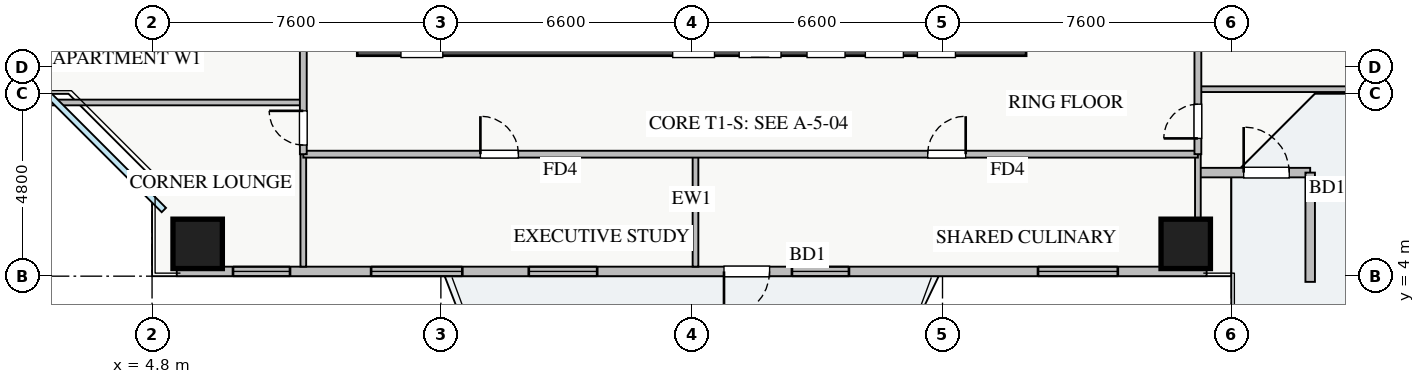
"""IFC4 building model, lengths in metres.
Left out: names, types, materials, properties, quantities, classifications, styles, units other than length and angle.
Written with IfcOpenShell. Run it as: python <this file> out.ifc"""

import sys

from ifc_helpers import new_model, si_unit, direction, frame, frame_2d, origin, origin_2d, place, context, subcontext, project, spatial, rectangle, extrude, source, transform, mapped, element, fill, save


model = new_model("IFC4")
c1 = context("Model", 3, precision=1e-05, world=origin(), true_north=direction((0.0, 1.0)))
c2 = subcontext(c1, "Body", "Model", "MODEL_VIEW")
j1 = project(units=[si_unit("LENGTHUNIT", "METRE"), si_unit("PLANEANGLEUNIT", "RADIAN")], contexts=[c1])
p1 = place(None, origin())
s1 = spatial("IfcSite", under=j1, at=p1, CompositionType="ELEMENT")
p2 = place(p1, origin())
s2 = spatial("IfcBuilding", under=s1, at=p2, CompositionType="ELEMENT")
p3 = place(p2, frame((0.0, 0.0, 73.0)))
s3 = spatial("IfcBuildingStorey", under=s2, at=p3, CompositionType="ELEMENT", Elevation=73.0)
p4 = place(p3, frame((10.2, 10.2, 0.0), z_axis=(0.0, 0.0, 1.0), x_axis=(1.0, 0.0, 0.0)))
e1 = element("IfcWall", 1, at=p4, inside=s3, PredefinedType="SHEAR", context=c2, shape_type="SweptSolid", body=[
    extrude(rectangle(XDim=17.6, YDim=0.8, at=frame_2d((8.8, 0.0))), origin(), (0.0, 0.0, 1.0), 3.25),
])
p5 = place(p4, frame((1.15, 0.0, 0.0)))
e2 = element("IfcOpeningElement", 2, at=p5, cuts=e1, PredefinedType="OPENING", context=c2, shape_type="SweptSolid", body=[
    extrude(rectangle(XDim=1.1, YDim=2.05, at=frame_2d((0.55, 1.025))), frame((0.0, 0.41, 0.0), z_axis=(0.0, -1.0, 0.0), x_axis=(1.0, 0.0, 0.0)), (0.0, 0.0, 1.0), 0.82),
])
p6 = place(p4, frame((8.3, 0.0, 0.0)))
e3 = element("IfcOpeningElement", 3, at=p6, cuts=e1, PredefinedType="OPENING", context=c2, shape_type="SweptSolid", body=[
    extrude(rectangle(XDim=1.1, YDim=2.05, at=frame_2d((0.55, 1.025))), frame((0.0, 0.41, 0.0), z_axis=(0.0, -1.0, 0.0), x_axis=(1.0, 0.0, 0.0)), (0.0, 0.0, 1.0), 0.82),
])
p7 = place(p4, frame((10.05, 0.0, 0.0)))
e4 = element("IfcOpeningElement", 4, at=p7, cuts=e1, PredefinedType="OPENING", context=c2, shape_type="SweptSolid", body=[
    extrude(rectangle(XDim=1.1, YDim=2.05, at=frame_2d((0.55, 1.025))), frame((0.0, 0.41, 0.0), z_axis=(0.0, -1.0, 0.0), x_axis=(1.0, 0.0, 0.0)), (0.0, 0.0, 1.0), 0.82),
])
p8 = place(p4, frame((14.74, 0.0, 0.0)))
e5 = element("IfcOpeningElement", 5, at=p8, cuts=e1, PredefinedType="OPENING", context=c2, shape_type="SweptSolid", body=[
    extrude(rectangle(XDim=1.0, YDim=2.05, at=frame_2d((0.5, 1.025))), frame((0.0, 0.41, 0.0), z_axis=(0.0, -1.0, 0.0), x_axis=(1.0, 0.0, 0.0)), (0.0, 0.0, 1.0), 0.82),
])
p9 = place(p4, frame((11.835, 0.0, 0.0)))
e6 = element("IfcOpeningElement", 6, at=p9, cuts=e1, PredefinedType="OPENING", context=c2, shape_type="SweptSolid", body=[
    extrude(rectangle(XDim=1.0, YDim=2.05, at=frame_2d((0.5, 1.025))), frame((0.0, 0.41, 0.0), z_axis=(0.0, -1.0, 0.0), x_axis=(1.0, 0.0, 0.0)), (0.0, 0.0, 1.0), 0.82),
])
p10 = place(p4, frame((13.37, 0.0, 0.0)))
e7 = element("IfcOpeningElement", 7, at=p10, cuts=e1, PredefinedType="OPENING", context=c2, shape_type="SweptSolid", body=[
    extrude(rectangle(XDim=1.0, YDim=2.05, at=frame_2d((0.5, 1.025))), frame((0.0, 0.41, 0.0), z_axis=(0.0, -1.0, 0.0), x_axis=(1.0, 0.0, 0.0)), (0.0, 0.0, 1.0), 0.82),
])
m1 = source(origin(), c2, "Body", "SweptSolid", [
    extrude(rectangle(XDim=1.3, YDim=1.3, at=origin_2d()), origin(), (0.0, 0.0, 1.0), 3.25),
])
for number, where, z_axis, x_axis in (
    (8, (6.0, 4.85, 0.0), (0.0, 0.0, 1.0), (1.0, 0.0, 0.0)),
    (9, (32.0, 4.85, 0.0), (0.0, 0.0, 1.0), (1.0, 0.0, 0.0)),
):
    element("IfcColumn", number, at=place(p3, frame(where, z_axis=z_axis, x_axis=x_axis)), inside=s3, PredefinedType="COLUMN", context=c2, shape_type="MappedRepresentation", body=[
        mapped(m1, transform((0.0, 0.0, 0.0), x_axis=(1.0, 0.0, 0.0), y_axis=(0.0, 1.0, 0.0), z_axis=(0.0, 0.0, 1.0), scale=1.0)),
    ])
p11 = place(p3, frame((5.45, 4.125, 0.0), z_axis=(0.0, 0.0, 1.0), x_axis=(1.0, 0.0, 0.0)))
e10 = element("IfcWall", 10, at=p11, inside=s3, PredefinedType="STANDARD", context=c2, shape_type="SweptSolid", body=[
    extrude(rectangle(XDim=27.1, YDim=0.25, at=frame_2d((13.55, 0.0))), origin(), (0.0, 0.0, 1.0), 2.61),
])
p12 = place(p11, frame((14.4, 0.0, 0.0)))
e11 = element("IfcOpeningElement", 11, at=p12, cuts=e10, PredefinedType="OPENING", context=c2, shape_type="SweptSolid", body=[
    extrude(rectangle(XDim=1.2, YDim=2.1, at=frame_2d((0.6, 1.05))), frame((0.0, 0.135, 0.0), z_axis=(0.0, -1.0, 0.0), x_axis=(1.0, 0.0, 0.0)), (0.0, 0.0, 1.0), 0.27),
])
p13 = place(p11, frame((1.48, 0.0, 0.9)))
e12 = element("IfcOpeningElement", 12, at=p13, cuts=e10, PredefinedType="OPENING", context=c2, shape_type="SweptSolid", body=[
    extrude(rectangle(XDim=1.5, YDim=1.5, at=frame_2d((0.75, 0.75))), frame((0.0, 0.135, 0.0), z_axis=(0.0, -1.0, 0.0), x_axis=(1.0, 0.0, 0.0)), (0.0, 0.0, 1.0), 0.27),
])
p14 = place(p11, frame((9.263, 0.0, 0.9)))
e13 = element("IfcOpeningElement", 13, at=p14, cuts=e10, PredefinedType="OPENING", context=c2, shape_type="SweptSolid", body=[
    extrude(rectangle(XDim=1.8, YDim=1.45, at=frame_2d((0.9, 0.725))), frame((0.0, 0.135, 0.0), z_axis=(0.0, -1.0, 0.0), x_axis=(1.0, 0.0, 0.0)), (0.0, 0.0, 1.0), 0.27),
])
p15 = place(p11, frame((16.188, 0.0, 0.9)))
e14 = element("IfcOpeningElement", 14, at=p15, cuts=e10, PredefinedType="OPENING", context=c2, shape_type="SweptSolid", body=[
    extrude(rectangle(XDim=1.5, YDim=1.45, at=frame_2d((0.75, 0.725))), frame((0.0, 0.135, 0.0), z_axis=(0.0, -1.0, 0.0), x_axis=(1.0, 0.0, 0.0)), (0.0, 0.0, 1.0), 0.27),
])
p16 = place(p11, frame((22.663, 0.0, 0.9)))
e15 = element("IfcOpeningElement", 15, at=p16, cuts=e10, PredefinedType="OPENING", context=c2, shape_type="SweptSolid", body=[
    extrude(rectangle(XDim=2.1, YDim=1.48, at=frame_2d((1.05, 0.74))), frame((0.0, 0.135, 0.0), z_axis=(0.0, -1.0, 0.0), x_axis=(1.0, 0.0, 0.0)), (0.0, 0.0, 1.0), 0.27),
])
p17 = place(p11, frame((5.114, 0.0, 0.9)))
e16 = element("IfcOpeningElement", 16, at=p17, cuts=e10, PredefinedType="OPENING", context=c2, shape_type="SweptSolid", body=[
    extrude(rectangle(XDim=2.4, YDim=1.5, at=frame_2d((1.2, 0.75))), frame((0.0, 0.135, 0.0), z_axis=(0.0, -1.0, 0.0), x_axis=(1.0, 0.0, 0.0)), (0.0, 0.0, 1.0), 0.27),
])
p18 = place(p3, frame((32.375, 6.725, 0.0), z_axis=(0.0, 0.0, 1.0), x_axis=(1.0, 0.0, 0.0)))
e17 = element("IfcWall", 17, at=p18, inside=s3, PredefinedType="STANDARD", context=c2, shape_type="SweptSolid", body=[
    extrude(rectangle(XDim=2.9, YDim=0.25, at=frame_2d((1.45, 0.0))), origin(), (0.0, 0.0, 1.0), 2.61),
])
p19 = place(p18, frame((1.15, 0.0, 0.0)))
e18 = element("IfcOpeningElement", 18, at=p19, cuts=e17, PredefinedType="OPENING", context=c2, shape_type="SweptSolid", body=[
    extrude(rectangle(XDim=1.2, YDim=2.1, at=frame_2d((0.6, 1.05))), frame((0.0, 0.135, 0.0), z_axis=(0.0, -1.0, 0.0), x_axis=(1.0, 0.0, 0.0)), (0.0, 0.0, 1.0), 0.27),
])
p20 = place(p3, frame((35.275, 3.85, 0.0), z_axis=(0.0, 0.0, 1.0), x_axis=(0.0, 1.0, 0.0)))
e19 = element("IfcWall", 19, at=p20, inside=s3, PredefinedType="STANDARD", context=c2, shape_type="SweptSolid", body=[
    extrude(rectangle(XDim=2.875, YDim=0.25, at=frame_2d((1.438, 0.0))), origin(), (0.0, 0.0, 1.0), 2.61),
])
p21 = place(p3, frame((19.1, 4.25, 0.0), z_axis=(0.0, 0.0, 1.0), x_axis=(0.0, 1.0, 0.0)))
e20 = element("IfcWall", 20, at=p21, inside=s3, PredefinedType="PARTITIONING", context=c2, shape_type="SweptSolid", body=[
    extrude(rectangle(XDim=2.96, YDim=0.15, at=frame_2d((1.48, 0.0))), origin(), (0.0, 0.0, 1.0), 2.771),
])
for number, where, z_axis, x_axis in (
    (21, (8.78, 4.25, 0.0), (0.0, 0.0, 1.0), (0.0, 1.0, 0.0)),
    (22, (32.32, 4.25, 0.0), (0.0, 0.0, 1.0), (0.0, 1.0, 0.0)),
):
    element("IfcWall", number, at=place(p3, frame(where, z_axis=z_axis, x_axis=x_axis)), inside=s3, PredefinedType="PARTITIONING", context=c2, shape_type="SweptSolid", body=[
        extrude(rectangle(XDim=2.96, YDim=0.15, at=frame_2d((1.48, 0.0))), origin(), (0.0, 0.0, 1.0), 3.07),
    ])
p22 = place(p3, frame((8.78, 7.21, 0.0), z_axis=(0.0, 0.0, 1.0), x_axis=(1.0, 0.0, 0.0)))
e23 = element("IfcWall", 23, at=p22, inside=s3, PredefinedType="PARTITIONING", context=c2, shape_type="SweptSolid", body=[
    extrude(rectangle(XDim=23.54, YDim=0.18, at=frame_2d((11.77, 0.0))), origin(), (0.0, 0.0, 1.0), 3.07),
])
p23 = place(p22, frame((4.66, 0.0, 0.0)))
e24 = element("IfcOpeningElement", 24, at=p23, cuts=e23, PredefinedType="OPENING", context=c2, shape_type="SweptSolid", body=[
    extrude(rectangle(XDim=1.0, YDim=2.05, at=frame_2d((0.5, 1.025))), frame((0.0, 0.1, 0.0), z_axis=(0.0, -1.0, 0.0), x_axis=(1.0, 0.0, 0.0)), (0.0, 0.0, 1.0), 0.2),
])
p24 = place(p22, frame((16.43, 0.0, 0.0)))
e25 = element("IfcOpeningElement", 25, at=p24, cuts=e23, PredefinedType="OPENING", context=c2, shape_type="SweptSolid", body=[
    extrude(rectangle(XDim=1.0, YDim=2.05, at=frame_2d((0.5, 1.025))), frame((0.0, 0.1, 0.0), z_axis=(0.0, -1.0, 0.0), x_axis=(1.0, 0.0, 0.0)), (0.0, 0.0, 1.0), 0.2),
])
p25 = place(p3, frame((0.25, 8.57, 0.0), z_axis=(0.0, 0.0, 1.0), x_axis=(1.0, 0.0, 0.0)))
e26 = element("IfcWall", 26, at=p25, inside=s3, PredefinedType="PARTITIONING", context=c2, shape_type="SweptSolid", body=[
    extrude(rectangle(XDim=8.53, YDim=0.15, at=frame_2d((4.265, 0.0))), origin(), (0.0, 0.0, 1.0), 3.07),
])
p26 = place(p3, frame((8.78, 7.21, 0.0), z_axis=(0.0, 0.0, 1.0), x_axis=(0.0, 1.0, 0.0)))
e27 = element("IfcWall", 27, at=p26, inside=s3, PredefinedType="PARTITIONING", context=c2, shape_type="SweptSolid", body=[
    extrude(rectangle(XDim=31.23, YDim=0.18, at=frame_2d((15.615, 0.0))), origin(), (0.0, 0.0, 1.0), 3.07),
])
p27 = place(p26, frame((30.09, 0.0, 0.0)))
e28 = element("IfcOpeningElement", 28, at=p27, cuts=e27, PredefinedType="OPENING", context=c2, shape_type="SweptSolid", body=[
    extrude(rectangle(XDim=0.9, YDim=2.05, at=frame_2d((0.45, 1.025))), frame((0.0, 0.1, 0.0), z_axis=(0.0, -1.0, 0.0), x_axis=(1.0, 0.0, 0.0)), (0.0, 0.0, 1.0), 0.2),
])
p28 = place(p26, frame((0.24, 0.0, 0.0)))
e29 = element("IfcOpeningElement", 29, at=p28, cuts=e27, PredefinedType="OPENING", context=c2, shape_type="SweptSolid", body=[
    extrude(rectangle(XDim=0.9, YDim=2.05, at=frame_2d((0.45, 1.025))), frame((0.0, 0.1, 0.0), z_axis=(0.0, -1.0, 0.0), x_axis=(1.0, 0.0, 0.0)), (0.0, 0.0, 1.0), 0.2),
])
p29 = place(p26, frame((2.84, 0.0, 0.0)))
e30 = element("IfcOpeningElement", 30, at=p29, cuts=e27, PredefinedType="OPENING", context=c2, shape_type="SweptSolid", body=[
    extrude(rectangle(XDim=1.0, YDim=2.05, at=frame_2d((0.5, 1.025))), frame((0.0, 0.1, 0.0), z_axis=(0.0, -1.0, 0.0), x_axis=(1.0, 0.0, 0.0)), (0.0, 0.0, 1.0), 0.2),
])
p30 = place(p26, frame((12.11, 0.0, 0.0)))
e31 = element("IfcOpeningElement", 31, at=p30, cuts=e27, PredefinedType="OPENING", context=c2, shape_type="SweptSolid", body=[
    extrude(rectangle(XDim=1.0, YDim=2.05, at=frame_2d((0.5, 1.025))), frame((0.0, 0.1, 0.0), z_axis=(0.0, -1.0, 0.0), x_axis=(1.0, 0.0, 0.0)), (0.0, 0.0, 1.0), 0.2),
])
p31 = place(p26, frame((24.62, 0.0, 0.0)))
e32 = element("IfcOpeningElement", 32, at=p31, cuts=e27, PredefinedType="OPENING", context=c2, shape_type="SweptSolid", body=[
    extrude(rectangle(XDim=1.0, YDim=2.05, at=frame_2d((0.5, 1.025))), frame((0.0, 0.1, 0.0), z_axis=(0.0, -1.0, 0.0), x_axis=(1.0, 0.0, 0.0)), (0.0, 0.0, 1.0), 0.2),
])
p32 = place(p3, frame((32.32, 8.92, 0.0), z_axis=(0.0, 0.0, 1.0), x_axis=(1.0, 0.0, 0.0)))
e33 = element("IfcWall", 33, at=p32, inside=s3, PredefinedType="PARTITIONING", context=c2, shape_type="SweptSolid", body=[
    extrude(rectangle(XDim=5.43, YDim=0.15, at=frame_2d((2.715, 0.0))), origin(), (0.0, 0.0, 1.0), 3.07),
])
p33 = place(p3, frame((32.32, 7.21, 0.0), z_axis=(0.0, 0.0, 1.0), x_axis=(0.0, 1.0, 0.0)))
e34 = element("IfcWall", 34, at=p33, inside=s3, PredefinedType="PARTITIONING", context=c2, shape_type="SweptSolid", body=[
    extrude(rectangle(XDim=31.23, YDim=0.18, at=frame_2d((15.615, 0.0))), origin(), (0.0, 0.0, 1.0), 2.771),
])
p34 = place(p33, frame((30.09, 0.0, 0.0)))
e35 = element("IfcOpeningElement", 35, at=p34, cuts=e34, PredefinedType="OPENING", context=c2, shape_type="SweptSolid", body=[
    extrude(rectangle(XDim=0.9, YDim=2.05, at=frame_2d((0.45, 1.025))), frame((0.0, 0.1, 0.0), z_axis=(0.0, -1.0, 0.0), x_axis=(1.0, 0.0, 0.0)), (0.0, 0.0, 1.0), 0.2),
])
p35 = place(p33, frame((0.415, 0.0, 0.0)))
e36 = element("IfcOpeningElement", 36, at=p35, cuts=e34, PredefinedType="OPENING", context=c2, shape_type="SweptSolid", body=[
    extrude(rectangle(XDim=0.9, YDim=2.05, at=frame_2d((0.45, 1.025))), frame((0.0, 0.1, 0.0), z_axis=(0.0, -1.0, 0.0), x_axis=(1.0, 0.0, 0.0)), (0.0, 0.0, 1.0), 0.2),
])
p36 = place(p33, frame((4.99, 0.0, 0.0)))
e37 = element("IfcOpeningElement", 37, at=p36, cuts=e34, PredefinedType="OPENING", context=c2, shape_type="SweptSolid", body=[
    extrude(rectangle(XDim=1.0, YDim=2.05, at=frame_2d((0.5, 1.025))), frame((0.0, 0.1, 0.0), z_axis=(0.0, -1.0, 0.0), x_axis=(1.0, 0.0, 0.0)), (0.0, 0.0, 1.0), 0.2),
])
p37 = place(p33, frame((19.355, 0.0, 0.0)))
e38 = element("IfcOpeningElement", 38, at=p37, cuts=e34, PredefinedType="OPENING", context=c2, shape_type="SweptSolid", body=[
    extrude(rectangle(XDim=1.0, YDim=2.05, at=frame_2d((0.5, 1.025))), frame((0.0, 0.1, 0.0), z_axis=(0.0, -1.0, 0.0), x_axis=(1.0, 0.0, 0.0)), (0.0, 0.0, 1.0), 0.2),
])
m2 = source(origin(), c2, "Body", "SweptSolid", [
    extrude(rectangle(XDim=1.2, YDim=2.1, at=frame_2d((0.6, 1.05))), frame((0.0, 0.025, 0.0), z_axis=(0.0, -1.0, 0.0), x_axis=(1.0, 0.0, 0.0)), (0.0, 0.0, 1.0), 0.05),
])
p38 = place(p12, frame((1.2, 0.0, 0.0), z_axis=(0.0, 0.0, 1.0), x_axis=(-1.0, 0.0, 0.0)))
e39 = element("IfcDoor", 39, at=p38, inside=s3, OperationType="SINGLE_SWING_LEFT", PredefinedType="DOOR", context=c2, shape_type="MappedRepresentation", body=[
    mapped(m2, transform((0.0, 0.0, 0.0), x_axis=(1.0, 0.0, 0.0), y_axis=(0.0, 1.0, 0.0), z_axis=(0.0, 0.0, 1.0), scale=1.0)),
])
fill(e11, e39)
m3 = source(origin(), c2, "Body", "SweptSolid", [
    extrude(rectangle(XDim=1.5, YDim=1.5, at=frame_2d((0.75, 0.75))), frame((0.0, 0.03, 0.0), z_axis=(0.0, -1.0, 0.0), x_axis=(1.0, 0.0, 0.0)), (0.0, 0.0, 1.0), 0.06),
])
p39 = place(p13, origin())
e40 = element("IfcWindow", 40, at=p39, inside=s3, PartitioningType="TRIPLE_PANEL_VERTICAL", PredefinedType="WINDOW", context=c2, shape_type="MappedRepresentation", body=[
    mapped(m3, transform((0.0, 0.0, 0.0), x_axis=(1.0, 0.0, 0.0), y_axis=(0.0, 1.0, 0.0), z_axis=(0.0, 0.0, 1.0), scale=1.0)),
])
fill(e12, e40)
m4 = source(origin(), c2, "Body", "SweptSolid", [
    extrude(rectangle(XDim=1.8, YDim=1.45, at=frame_2d((0.9, 0.725))), frame((0.0, 0.03, 0.0), z_axis=(0.0, -1.0, 0.0), x_axis=(1.0, 0.0, 0.0)), (0.0, 0.0, 1.0), 0.06),
])
p40 = place(p14, origin())
e41 = element("IfcWindow", 41, at=p40, inside=s3, PartitioningType="DOUBLE_PANEL_VERTICAL", PredefinedType="WINDOW", context=c2, shape_type="MappedRepresentation", body=[
    mapped(m4, transform((0.0, 0.0, 0.0), x_axis=(1.0, 0.0, 0.0), y_axis=(0.0, 1.0, 0.0), z_axis=(0.0, 0.0, 1.0), scale=1.0)),
])
fill(e13, e41)
m5 = source(origin(), c2, "Body", "SweptSolid", [
    extrude(rectangle(XDim=1.5, YDim=1.45, at=frame_2d((0.75, 0.725))), frame((0.0, 0.03, 0.0), z_axis=(0.0, -1.0, 0.0), x_axis=(1.0, 0.0, 0.0)), (0.0, 0.0, 1.0), 0.06),
])
p41 = place(p15, origin())
e42 = element("IfcWindow", 42, at=p41, inside=s3, PartitioningType="DOUBLE_PANEL_VERTICAL", PredefinedType="WINDOW", context=c2, shape_type="MappedRepresentation", body=[
    mapped(m5, transform((0.0, 0.0, 0.0), x_axis=(1.0, 0.0, 0.0), y_axis=(0.0, 1.0, 0.0), z_axis=(0.0, 0.0, 1.0), scale=1.0)),
])
fill(e14, e42)
m6 = source(origin(), c2, "Body", "SweptSolid", [
    extrude(rectangle(XDim=2.1, YDim=1.48, at=frame_2d((1.05, 0.74))), frame((0.0, 0.03, 0.0), z_axis=(0.0, -1.0, 0.0), x_axis=(1.0, 0.0, 0.0)), (0.0, 0.0, 1.0), 0.06),
])
p42 = place(p16, origin())
e43 = element("IfcWindow", 43, at=p42, inside=s3, PartitioningType="TRIPLE_PANEL_VERTICAL", PredefinedType="WINDOW", context=c2, shape_type="MappedRepresentation", body=[
    mapped(m6, transform((0.0, 0.0, 0.0), x_axis=(1.0, 0.0, 0.0), y_axis=(0.0, 1.0, 0.0), z_axis=(0.0, 0.0, 1.0), scale=1.0)),
])
fill(e15, e43)
p43 = place(p19, origin())
e44 = element("IfcDoor", 44, at=p43, inside=s3, OperationType="SINGLE_SWING_LEFT", PredefinedType="DOOR", context=c2, shape_type="MappedRepresentation", body=[
    mapped(m2, transform((0.0, 0.0, 0.0), x_axis=(1.0, 0.0, 0.0), y_axis=(0.0, 1.0, 0.0), z_axis=(0.0, 0.0, 1.0), scale=1.0)),
])
fill(e18, e44)
m7 = source(origin(), c2, "Body", "SweptSolid", [
    extrude(rectangle(XDim=1.0, YDim=2.05, at=frame_2d((0.5, 1.025))), frame((0.0, 0.025, 0.0), z_axis=(0.0, -1.0, 0.0), x_axis=(1.0, 0.0, 0.0)), (0.0, 0.0, 1.0), 0.05),
])
p44 = place(p23, origin())
e45 = element("IfcDoor", 45, at=p44, inside=s3, OperationType="SINGLE_SWING_LEFT", PredefinedType="DOOR", context=c2, shape_type="MappedRepresentation", body=[
    mapped(m7, transform((0.0, 0.0, 0.0), x_axis=(1.0, 0.0, 0.0), y_axis=(0.0, 1.0, 0.0), z_axis=(0.0, 0.0, 1.0), scale=1.0)),
])
fill(e24, e45)
p45 = place(p24, origin())
e46 = element("IfcDoor", 46, at=p45, inside=s3, OperationType="SINGLE_SWING_RIGHT", PredefinedType="DOOR", context=c2, shape_type="MappedRepresentation", body=[
    mapped(m7, transform((0.0, 0.0, 0.0), x_axis=(1.0, 0.0, 0.0), y_axis=(0.0, 1.0, 0.0), z_axis=(0.0, 0.0, 1.0), scale=1.0)),
])
fill(e25, e46)
m8 = source(origin(), c2, "Body", "SweptSolid", [
    extrude(rectangle(XDim=0.9, YDim=2.05, at=frame_2d((0.45, 1.025))), frame((0.0, 0.025, 0.0), z_axis=(0.0, -1.0, 0.0), x_axis=(1.0, 0.0, 0.0)), (0.0, 0.0, 1.0), 0.05),
])
p46 = place(p28, origin())
e47 = element("IfcDoor", 47, at=p46, inside=s3, OperationType="SINGLE_SWING_RIGHT", PredefinedType="DOOR", context=c2, shape_type="MappedRepresentation", body=[
    mapped(m8, transform((0.0, 0.0, 0.0), x_axis=(1.0, 0.0, 0.0), y_axis=(0.0, 1.0, 0.0), z_axis=(0.0, 0.0, 1.0), scale=1.0)),
])
fill(e29, e47)
p47 = place(p35, origin())
e48 = element("IfcDoor", 48, at=p47, inside=s3, OperationType="SINGLE_SWING_LEFT", PredefinedType="DOOR", context=c2, shape_type="MappedRepresentation", body=[
    mapped(m8, transform((0.0, 0.0, 0.0), x_axis=(1.0, 0.0, 0.0), y_axis=(0.0, 1.0, 0.0), z_axis=(0.0, 0.0, 1.0), scale=1.0)),
])
fill(e36, e48)
m9 = source(origin(), c2, "Body", "SweptSolid", [
    extrude(rectangle(XDim=2.4, YDim=1.5, at=frame_2d((1.2, 0.75))), frame((0.0, 0.03, 0.0), z_axis=(0.0, -1.0, 0.0), x_axis=(1.0, 0.0, 0.0)), (0.0, 0.0, 1.0), 0.06),
])
p48 = place(p17, origin())
e49 = element("IfcWindow", 49, at=p48, inside=s3, PartitioningType="TRIPLE_PANEL_VERTICAL", PredefinedType="WINDOW", context=c2, shape_type="MappedRepresentation", body=[
    mapped(m9, transform((0.0, 0.0, 0.0), x_axis=(1.0, 0.0, 0.0), y_axis=(0.0, 1.0, 0.0), z_axis=(0.0, 0.0, 1.0), scale=1.0)),
])
fill(e16, e49)
save(model, sys.argv[1])
